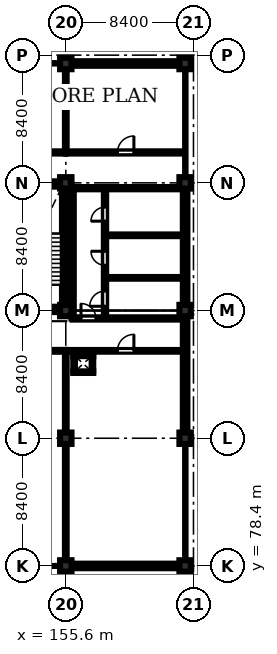
"""IFC4 building model, lengths in metres.
Left out: names, types, materials, properties, quantities, classifications, styles, units other than length and angle.
Written with IfcOpenShell. Run it as: python <this file> out.ifc"""

import sys

from ifc_helpers import new_model, si_unit, direction, frame, frame_2d, origin, origin_2d, place, context, subcontext, project, spatial, rectangle, extrude, element, fill, save


model = new_model("IFC4")
c1 = context("Model", 3, precision=1e-05, world=origin(), true_north=direction((0.0, 1.0)))
c2 = subcontext(c1, "Body", "Model", "MODEL_VIEW")
j1 = project(units=[si_unit("LENGTHUNIT", "METRE"), si_unit("PLANEANGLEUNIT", "RADIAN")], contexts=[c1])
p1 = place(None, origin())
s1 = spatial("IfcSite", under=j1, at=p1, CompositionType="ELEMENT")
p2 = place(p1, origin())
s2 = spatial("IfcBuilding", under=s1, at=p2, CompositionType="ELEMENT")
p3 = place(p2, frame((0.0, 0.0, 52.8)))
s3 = spatial("IfcBuildingStorey", under=s2, at=p3, CompositionType="ELEMENT", Elevation=52.8)
for number, where, z_axis, x_axis in (
    (1, (155.6, 78.4, 0.0), (0.0, 0.0, 1.0), (1.0, 0.0, 0.0)),
    (2, (155.6, 86.8, 0.0), (0.0, 0.0, 1.0), (1.0, 0.0, 0.0)),
    (3, (155.6, 95.2, 0.0), (0.0, 0.0, 1.0), (1.0, 0.0, 0.0)),
    (4, (155.6, 103.6, 0.0), (0.0, 0.0, 1.0), (1.0, 0.0, 0.0)),
    (5, (155.6, 111.45, 0.0), (0.0, 0.0, 1.0), (1.0, 0.0, 0.0)),
    (6, (163.45, 78.4, 0.0), (0.0, 0.0, 1.0), (1.0, 0.0, 0.0)),
    (7, (163.45, 86.8, 0.0), (0.0, 0.0, 1.0), (1.0, 0.0, 0.0)),
    (8, (163.45, 95.2, 0.0), (0.0, 0.0, 1.0), (1.0, 0.0, 0.0)),
    (9, (163.45, 103.6, 0.0), (0.0, 0.0, 1.0), (1.0, 0.0, 0.0)),
    (10, (163.45, 111.45, 0.0), (0.0, 0.0, 1.0), (1.0, 0.0, 0.0)),
):
    element("IfcColumn", number, at=place(p3, frame(where, z_axis=z_axis, x_axis=x_axis)), inside=s3, PredefinedType="COLUMN", context=c2, shape_type="SweptSolid", body=[
        extrude(rectangle(XDim=0.75, YDim=0.75, at=origin_2d()), origin(), (0.0, 0.0, 1.0), 4.03),
    ])
for number, where, z_axis, x_axis in (
    (11, (151.9, 95.275, 0.0), (0.0, 0.0, 1.0), (1.0, 0.0, 0.0)),
    (12, (151.9, 103.525, 0.0), (0.0, 0.0, 1.0), (1.0, 0.0, 0.0)),
):
    element("IfcWall", number, at=place(p3, frame(where, z_axis=z_axis, x_axis=x_axis)), inside=s3, PredefinedType="SHEAR", context=c2, shape_type="SweptSolid", body=[
        extrude(rectangle(XDim=3.8, YDim=0.35, at=frame_2d((1.9, 0.0))), origin(), (0.0, 0.0, 1.0), 4.03),
    ])
p4 = place(p3, frame((155.525, 95.45, 0.0), z_axis=(0.0, 0.0, 1.0), x_axis=(0.0, 1.0, 0.0)))
e13 = element("IfcWall", 13, at=p4, inside=s3, PredefinedType="SHEAR", context=c2, shape_type="SweptSolid", body=[
    extrude(rectangle(XDim=7.9, YDim=0.35, at=frame_2d((3.95, 0.0))), origin(), (0.0, 0.0, 1.0), 4.03),
])
p5 = place(p3, frame((155.975, 111.45, 0.0), z_axis=(0.0, 0.0, 1.0), x_axis=(1.0, 0.0, 0.0)))
e14 = element("IfcWall", 14, at=p5, inside=s3, PredefinedType="STANDARD", context=c2, shape_type="SweptSolid", body=[
    extrude(rectangle(XDim=7.1, YDim=0.3, at=frame_2d((3.55, 0.0))), origin(), (0.0, 0.0, 1.0), 3.33),
])
p6 = place(p5, frame((0.85, 0.0, 0.9)))
e15 = element("IfcOpeningElement", 15, at=p6, cuts=e14, PredefinedType="OPENING", context=c2, shape_type="SweptSolid", body=[
    extrude(rectangle(XDim=1.9, YDim=2.1, at=frame_2d((0.95, 1.05))), frame((0.0, 0.16, 0.0), z_axis=(0.0, -1.0, 0.0), x_axis=(1.0, 0.0, 0.0)), (0.0, 0.0, 1.0), 0.32),
])
p7 = place(p5, frame((4.65, 0.0, 0.9)))
e16 = element("IfcOpeningElement", 16, at=p7, cuts=e14, PredefinedType="OPENING", context=c2, shape_type="SweptSolid", body=[
    extrude(rectangle(XDim=1.9, YDim=2.1, at=frame_2d((0.95, 1.05))), frame((0.0, 0.16, 0.0), z_axis=(0.0, -1.0, 0.0), x_axis=(1.0, 0.0, 0.0)), (0.0, 0.0, 1.0), 0.32),
])
p8 = place(p3, frame((163.075, 78.4, 0.0), z_axis=(0.0, 0.0, 1.0), x_axis=(-1.0, 0.0, 0.0)))
e17 = element("IfcWall", 17, at=p8, inside=s3, PredefinedType="STANDARD", context=c2, shape_type="SweptSolid", body=[
    extrude(rectangle(XDim=7.1, YDim=0.3, at=frame_2d((3.55, 0.0))), origin(), (0.0, 0.0, 1.0), 3.33),
])
p9 = place(p8, frame((1.15, 0.0, 0.95)))
e18 = element("IfcOpeningElement", 18, at=p9, cuts=e17, PredefinedType="OPENING", context=c2, shape_type="SweptSolid", body=[
    extrude(rectangle(XDim=1.65, YDim=1.85, at=frame_2d((0.825, 0.925))), frame((0.0, 0.16, 0.0), z_axis=(0.0, -1.0, 0.0), x_axis=(1.0, 0.0, 0.0)), (0.0, 0.0, 1.0), 0.32),
])
p10 = place(p3, frame((163.45, 94.825, 0.0), z_axis=(0.0, 0.0, 1.0), x_axis=(0.0, -1.0, 0.0)))
e19 = element("IfcWall", 19, at=p10, inside=s3, PredefinedType="STANDARD", context=c2, shape_type="SweptSolid", body=[
    extrude(rectangle(XDim=7.65, YDim=0.3, at=frame_2d((3.825, 0.0))), origin(), (0.0, 0.0, 1.0), 3.33),
])
p11 = place(p10, frame((4.2, 0.0, 1.1)))
e20 = element("IfcOpeningElement", 20, at=p11, cuts=e19, PredefinedType="OPENING", context=c2, shape_type="SweptSolid", body=[
    extrude(rectangle(XDim=1.8, YDim=1.8, at=frame_2d((0.9, 0.9))), frame((0.0, 0.16, 0.0), z_axis=(0.0, -1.0, 0.0), x_axis=(1.0, 0.0, 0.0)), (0.0, 0.0, 1.0), 0.32),
])
p12 = place(p3, frame((163.45, 103.225, 0.0), z_axis=(0.0, 0.0, 1.0), x_axis=(0.0, -1.0, 0.0)))
e21 = element("IfcWall", 21, at=p12, inside=s3, PredefinedType="STANDARD", context=c2, shape_type="SweptSolid", body=[
    extrude(rectangle(XDim=7.65, YDim=0.3, at=frame_2d((3.825, 0.0))), origin(), (0.0, 0.0, 1.0), 3.33),
])
p13 = place(p12, frame((1.15, 0.0, 1.1)))
e22 = element("IfcOpeningElement", 22, at=p13, cuts=e21, PredefinedType="OPENING", context=c2, shape_type="SweptSolid", body=[
    extrude(rectangle(XDim=1.4, YDim=1.4, at=frame_2d((0.7, 0.7))), frame((0.0, 0.16, 0.0), z_axis=(0.0, -1.0, 0.0), x_axis=(1.0, 0.0, 0.0)), (0.0, 0.0, 1.0), 0.32),
])
p14 = place(p3, frame((156.05, 94.68, 0.0), z_axis=(0.0, 0.0, 1.0), x_axis=(1.0, 0.0, 0.0)))
e23 = element("IfcWall", 23, at=p14, inside=s3, PredefinedType="PARTITIONING", context=c2, shape_type="SweptSolid", body=[
    extrude(rectangle(XDim=7.15, YDim=0.15, at=frame_2d((3.575, 0.0))), origin(), (0.0, 0.0, 1.0), 4.03),
])
p15 = place(p14, frame((0.55, 0.0, 0.0)))
e24 = element("IfcOpeningElement", 24, at=p15, cuts=e23, PredefinedType="OPENING", context=c2, shape_type="SweptSolid", body=[
    extrude(rectangle(XDim=0.98, YDim=2.12, at=frame_2d((0.49, 1.06))), frame((0.0, 0.085, 0.0), z_axis=(0.0, -1.0, 0.0), x_axis=(1.0, 0.0, 0.0)), (0.0, 0.0, 1.0), 0.17),
])
p16 = place(p3, frame((158.18, 94.68, 0.0), z_axis=(0.0, 0.0, 1.0), x_axis=(0.0, 1.0, 0.0)))
e25 = element("IfcWall", 25, at=p16, inside=s3, PredefinedType="PARTITIONING", context=c2, shape_type="SweptSolid", body=[
    extrude(rectangle(XDim=8.57, YDim=0.15, at=frame_2d((4.285, 0.0))), origin(), (0.0, 0.0, 1.0), 4.03),
])
p17 = place(p16, frame((0.8, 0.0, 0.0)))
e26 = element("IfcOpeningElement", 26, at=p17, cuts=e25, PredefinedType="OPENING", context=c2, shape_type="SweptSolid", body=[
    extrude(rectangle(XDim=1.0, YDim=2.12, at=frame_2d((0.5, 1.06))), frame((0.0, 0.085, 0.0), z_axis=(0.0, -1.0, 0.0), x_axis=(1.0, 0.0, 0.0)), (0.0, 0.0, 1.0), 0.17),
])
p18 = place(p16, frame((3.5, 0.0, 0.0)))
e27 = element("IfcOpeningElement", 27, at=p18, cuts=e25, PredefinedType="OPENING", context=c2, shape_type="SweptSolid", body=[
    extrude(rectangle(XDim=0.92, YDim=2.1, at=frame_2d((0.46, 1.05))), frame((0.0, 0.085, 0.0), z_axis=(0.0, -1.0, 0.0), x_axis=(1.0, 0.0, 0.0)), (0.0, 0.0, 1.0), 0.17),
])
p19 = place(p16, frame((6.4, 0.0, 0.0)))
e28 = element("IfcOpeningElement", 28, at=p19, cuts=e25, PredefinedType="OPENING", context=c2, shape_type="SweptSolid", body=[
    extrude(rectangle(XDim=0.92, YDim=2.1, at=frame_2d((0.46, 1.05))), frame((0.0, 0.085, 0.0), z_axis=(0.0, -1.0, 0.0), x_axis=(1.0, 0.0, 0.0)), (0.0, 0.0, 1.0), 0.17),
])
for number, where, z_axis, x_axis in (
    (29, (158.18, 97.35, 0.0), (0.0, 0.0, 1.0), (1.0, 0.0, 0.0)),
    (30, (158.18, 100.15, 0.0), (0.0, 0.0, 1.0), (1.0, 0.0, 0.0)),
):
    element("IfcWall", number, at=place(p3, frame(where, z_axis=z_axis, x_axis=x_axis)), inside=s3, PredefinedType="PARTITIONING", context=c2, shape_type="SweptSolid", body=[
        extrude(rectangle(XDim=5.02, YDim=0.112, at=frame_2d((2.51, 0.0))), origin(), (0.0, 0.0, 1.0), 4.03),
    ])
p20 = place(p3, frame((156.05, 103.25, 0.0), z_axis=(0.0, 0.0, 1.0), x_axis=(1.0, 0.0, 0.0)))
e31 = element("IfcWall", 31, at=p20, inside=s3, PredefinedType="PARTITIONING", context=c2, shape_type="SweptSolid", body=[
    extrude(rectangle(XDim=7.15, YDim=0.15, at=frame_2d((3.575, 0.0))), origin(), (0.0, 0.0, 1.0), 4.03),
])
p21 = place(p3, frame((156.05, 94.68, 0.0), z_axis=(0.0, 0.0, 1.0), x_axis=(0.0, 1.0, 0.0)))
e32 = element("IfcWall", 32, at=p21, inside=s3, PredefinedType="PARTITIONING", context=c2, shape_type="SweptSolid", body=[
    extrude(rectangle(XDim=8.57, YDim=0.15, at=frame_2d((4.285, 0.0))), origin(), (0.0, 0.0, 1.0), 4.03),
])
p22 = place(p3, frame((147.2, 105.6, 0.0), z_axis=(0.0, 0.0, 1.0), x_axis=(1.0, 0.0, 0.0)))
e33 = element("IfcWall", 33, at=p22, inside=s3, PredefinedType="PARTITIONING", context=c2, shape_type="SweptSolid", body=[
    extrude(rectangle(XDim=8.4, YDim=0.145, at=frame_2d((4.2, 0.0))), origin(), (0.0, 0.0, 1.0), 4.03),
])
p23 = place(p22, frame((3.4, 0.0, 0.0)))
e34 = element("IfcOpeningElement", 34, at=p23, cuts=e33, PredefinedType="OPENING", context=c2, shape_type="SweptSolid", body=[
    extrude(rectangle(XDim=1.32, YDim=2.2, at=frame_2d((0.66, 1.1))), frame((0.0, 0.083, 0.0), z_axis=(0.0, -1.0, 0.0), x_axis=(1.0, 0.0, 0.0)), (0.0, 0.0, 1.0), 0.165),
])
p24 = place(p3, frame((155.6, 105.6, 0.0), z_axis=(0.0, 0.0, 1.0), x_axis=(1.0, 0.0, 0.0)))
e35 = element("IfcWall", 35, at=p24, inside=s3, PredefinedType="PARTITIONING", context=c2, shape_type="SweptSolid", body=[
    extrude(rectangle(XDim=7.75, YDim=0.145, at=frame_2d((3.875, 0.0))), origin(), (0.0, 0.0, 1.0), 4.03),
])
p25 = place(p24, frame((3.4, 0.0, 0.0)))
e36 = element("IfcOpeningElement", 36, at=p25, cuts=e35, PredefinedType="OPENING", context=c2, shape_type="SweptSolid", body=[
    extrude(rectangle(XDim=1.08, YDim=2.15, at=frame_2d((0.54, 1.075))), frame((0.0, 0.083, 0.0), z_axis=(0.0, -1.0, 0.0), x_axis=(1.0, 0.0, 0.0)), (0.0, 0.0, 1.0), 0.165),
])
p26 = place(p3, frame((155.6, 105.6, 0.0), z_axis=(0.0, 0.0, 1.0), x_axis=(0.0, 1.0, 0.0)))
e37 = element("IfcWall", 37, at=p26, inside=s3, PredefinedType="PARTITIONING", context=c2, shape_type="SweptSolid", body=[
    extrude(rectangle(XDim=5.75, YDim=0.112, at=frame_2d((2.875, 0.0))), origin(), (0.0, 0.0, 1.0), 3.33),
])
p27 = place(p3, frame((147.2, 92.55, 0.0), z_axis=(0.0, 0.0, 1.0), x_axis=(1.0, 0.0, 0.0)))
e38 = element("IfcWall", 38, at=p27, inside=s3, PredefinedType="PARTITIONING", context=c2, shape_type="SweptSolid", body=[
    extrude(rectangle(XDim=8.4, YDim=0.12, at=frame_2d((4.2, 0.0))), origin(), (0.0, 0.0, 1.0), 4.03),
])
p28 = place(p27, frame((3.4, 0.0, 0.0)))
e39 = element("IfcOpeningElement", 39, at=p28, cuts=e38, PredefinedType="OPENING", context=c2, shape_type="SweptSolid", body=[
    extrude(rectangle(XDim=1.08, YDim=2.15, at=frame_2d((0.54, 1.075))), frame((0.0, 0.07, 0.0), z_axis=(0.0, -1.0, 0.0), x_axis=(1.0, 0.0, 0.0)), (0.0, 0.0, 1.0), 0.14),
])
p29 = place(p3, frame((155.6, 92.55, 0.0), z_axis=(0.0, 0.0, 1.0), x_axis=(1.0, 0.0, 0.0)))
e40 = element("IfcWall", 40, at=p29, inside=s3, PredefinedType="PARTITIONING", context=c2, shape_type="SweptSolid", body=[
    extrude(rectangle(XDim=7.75, YDim=0.112, at=frame_2d((3.875, 0.0))), origin(), (0.0, 0.0, 1.0), 4.03),
])
p30 = place(p29, frame((3.4, 0.0, 0.0)))
e41 = element("IfcOpeningElement", 41, at=p30, cuts=e40, PredefinedType="OPENING", context=c2, shape_type="SweptSolid", body=[
    extrude(rectangle(XDim=1.08, YDim=2.15, at=frame_2d((0.54, 1.075))), frame((0.0, 0.066, 0.0), z_axis=(0.0, -1.0, 0.0), x_axis=(1.0, 0.0, 0.0)), (0.0, 0.0, 1.0), 0.132),
])
p31 = place(p3, frame((155.6, 78.55, 0.0), z_axis=(0.0, 0.0, 1.0), x_axis=(0.0, 1.0, 0.0)))
e42 = element("IfcWall", 42, at=p31, inside=s3, PredefinedType="PARTITIONING", context=c2, shape_type="SweptSolid", body=[
    extrude(rectangle(XDim=14.0, YDim=0.112, at=frame_2d((7.0, 0.0))), origin(), (0.0, 0.0, 1.0), 3.33),
])
for number, where, z_axis, x_axis in (
    (43, (156.095, 91.147, 0.0), (0.0, 0.0, 1.0), (1.0, 0.0, 0.0)),
    (44, (156.095, 92.252, 0.0), (0.0, 0.0, 1.0), (1.0, 0.0, 0.0)),
):
    element("IfcWall", number, at=place(p3, frame(where, z_axis=z_axis, x_axis=x_axis)), inside=s3, PredefinedType="PARTITIONING", context=c2, shape_type="SweptSolid", body=[
        extrude(rectangle(XDim=1.31, YDim=0.105, at=frame_2d((0.655, 0.0))), origin(), (0.0, 0.0, 1.0), 4.03),
    ])
for number, where, z_axis, x_axis in (
    (45, (156.147, 91.2, 0.0), (0.0, 0.0, 1.0), (0.0, 1.0, 0.0)),
    (46, (157.353, 91.2, 0.0), (0.0, 0.0, 1.0), (0.0, 1.0, 0.0)),
):
    element("IfcWall", number, at=place(p3, frame(where, z_axis=z_axis, x_axis=x_axis)), inside=s3, PredefinedType="PARTITIONING", context=c2, shape_type="SweptSolid", body=[
        extrude(rectangle(XDim=1.0, YDim=0.105, at=frame_2d((0.5, 0.0))), origin(), (0.0, 0.0, 1.0), 4.03),
    ])
p32 = place(p6, origin())
e47 = element("IfcWindow", 47, at=p32, inside=s3, PartitioningType="DOUBLE_PANEL_VERTICAL", PredefinedType="WINDOW", context=c2, shape_type="SweptSolid", body=[
    extrude(rectangle(XDim=1.9, YDim=2.1, at=frame_2d((0.95, 1.05))), frame((0.0, 0.03, 0.0), z_axis=(0.0, -1.0, 0.0), x_axis=(1.0, 0.0, 0.0)), (0.0, 0.0, 1.0), 0.06),
])
fill(e15, e47)
p33 = place(p7, origin())
e48 = element("IfcWindow", 48, at=p33, inside=s3, PartitioningType="DOUBLE_PANEL_VERTICAL", PredefinedType="WINDOW", context=c2, shape_type="SweptSolid", body=[
    extrude(rectangle(XDim=1.9, YDim=2.1, at=frame_2d((0.95, 1.05))), frame((0.0, 0.03, 0.0), z_axis=(0.0, -1.0, 0.0), x_axis=(1.0, 0.0, 0.0)), (0.0, 0.0, 1.0), 0.06),
])
fill(e16, e48)
p34 = place(p9, origin())
e49 = element("IfcWindow", 49, at=p34, inside=s3, PartitioningType="DOUBLE_PANEL_VERTICAL", PredefinedType="WINDOW", context=c2, shape_type="SweptSolid", body=[
    extrude(rectangle(XDim=1.65, YDim=1.85, at=frame_2d((0.825, 0.925))), frame((0.0, 0.03, 0.0), z_axis=(0.0, -1.0, 0.0), x_axis=(1.0, 0.0, 0.0)), (0.0, 0.0, 1.0), 0.06),
])
fill(e18, e49)
p35 = place(p11, origin())
e50 = element("IfcWindow", 50, at=p35, inside=s3, PartitioningType="DOUBLE_PANEL_VERTICAL", PredefinedType="WINDOW", context=c2, shape_type="SweptSolid", body=[
    extrude(rectangle(XDim=1.8, YDim=1.8, at=frame_2d((0.9, 0.9))), frame((0.0, 0.03, 0.0), z_axis=(0.0, -1.0, 0.0), x_axis=(1.0, 0.0, 0.0)), (0.0, 0.0, 1.0), 0.06),
])
fill(e20, e50)
p36 = place(p13, origin())
e51 = element("IfcWindow", 51, at=p36, inside=s3, PartitioningType="SINGLE_PANEL", PredefinedType="WINDOW", context=c2, shape_type="SweptSolid", body=[
    extrude(rectangle(XDim=1.4, YDim=1.4, at=frame_2d((0.7, 0.7))), frame((0.0, 0.03, 0.0), z_axis=(0.0, -1.0, 0.0), x_axis=(1.0, 0.0, 0.0)), (0.0, 0.0, 1.0), 0.06),
])
fill(e22, e51)
p37 = place(p15, origin())
e52 = element("IfcDoor", 52, at=p37, inside=s3, OperationType="SINGLE_SWING_LEFT", PredefinedType="DOOR", context=c2, shape_type="SweptSolid", body=[
    extrude(rectangle(XDim=0.98, YDim=2.12, at=frame_2d((0.49, 1.06))), frame((0.0, 0.025, 0.0), z_axis=(0.0, -1.0, 0.0), x_axis=(1.0, 0.0, 0.0)), (0.0, 0.0, 1.0), 0.05),
])
fill(e24, e52)
p38 = place(p17, origin())
e53 = element("IfcDoor", 53, at=p38, inside=s3, OperationType="SINGLE_SWING_LEFT", PredefinedType="DOOR", context=c2, shape_type="SweptSolid", body=[
    extrude(rectangle(XDim=1.0, YDim=2.12, at=frame_2d((0.5, 1.06))), frame((0.0, 0.025, 0.0), z_axis=(0.0, -1.0, 0.0), x_axis=(1.0, 0.0, 0.0)), (0.0, 0.0, 1.0), 0.05),
])
fill(e26, e53)
p39 = place(p18, origin())
e54 = element("IfcDoor", 54, at=p39, inside=s3, OperationType="SINGLE_SWING_RIGHT", PredefinedType="DOOR", context=c2, shape_type="SweptSolid", body=[
    extrude(rectangle(XDim=0.92, YDim=2.1, at=frame_2d((0.46, 1.05))), frame((0.0, 0.025, 0.0), z_axis=(0.0, -1.0, 0.0), x_axis=(1.0, 0.0, 0.0)), (0.0, 0.0, 1.0), 0.05),
])
fill(e27, e54)
p40 = place(p19, origin())
e55 = element("IfcDoor", 55, at=p40, inside=s3, OperationType="SINGLE_SWING_LEFT", PredefinedType="DOOR", context=c2, shape_type="SweptSolid", body=[
    extrude(rectangle(XDim=0.92, YDim=2.1, at=frame_2d((0.46, 1.05))), frame((0.0, 0.025, 0.0), z_axis=(0.0, -1.0, 0.0), x_axis=(1.0, 0.0, 0.0)), (0.0, 0.0, 1.0), 0.05),
])
fill(e28, e55)
p41 = place(p25, origin())
e56 = element("IfcDoor", 56, at=p41, inside=s3, OperationType="SINGLE_SWING_RIGHT", PredefinedType="DOOR", context=c2, shape_type="SweptSolid", body=[
    extrude(rectangle(XDim=1.08, YDim=2.15, at=frame_2d((0.54, 1.075))), frame((0.0, 0.025, 0.0), z_axis=(0.0, -1.0, 0.0), x_axis=(1.0, 0.0, 0.0)), (0.0, 0.0, 1.0), 0.05),
])
fill(e36, e56)
p42 = place(p30, origin())
e57 = element("IfcDoor", 57, at=p42, inside=s3, OperationType="SINGLE_SWING_RIGHT", PredefinedType="DOOR", context=c2, shape_type="SweptSolid", body=[
    extrude(rectangle(XDim=1.08, YDim=2.15, at=frame_2d((0.54, 1.075))), frame((0.0, 0.025, 0.0), z_axis=(0.0, -1.0, 0.0), x_axis=(1.0, 0.0, 0.0)), (0.0, 0.0, 1.0), 0.05),
])
fill(e41, e57)
save(model, sys.argv[1])
